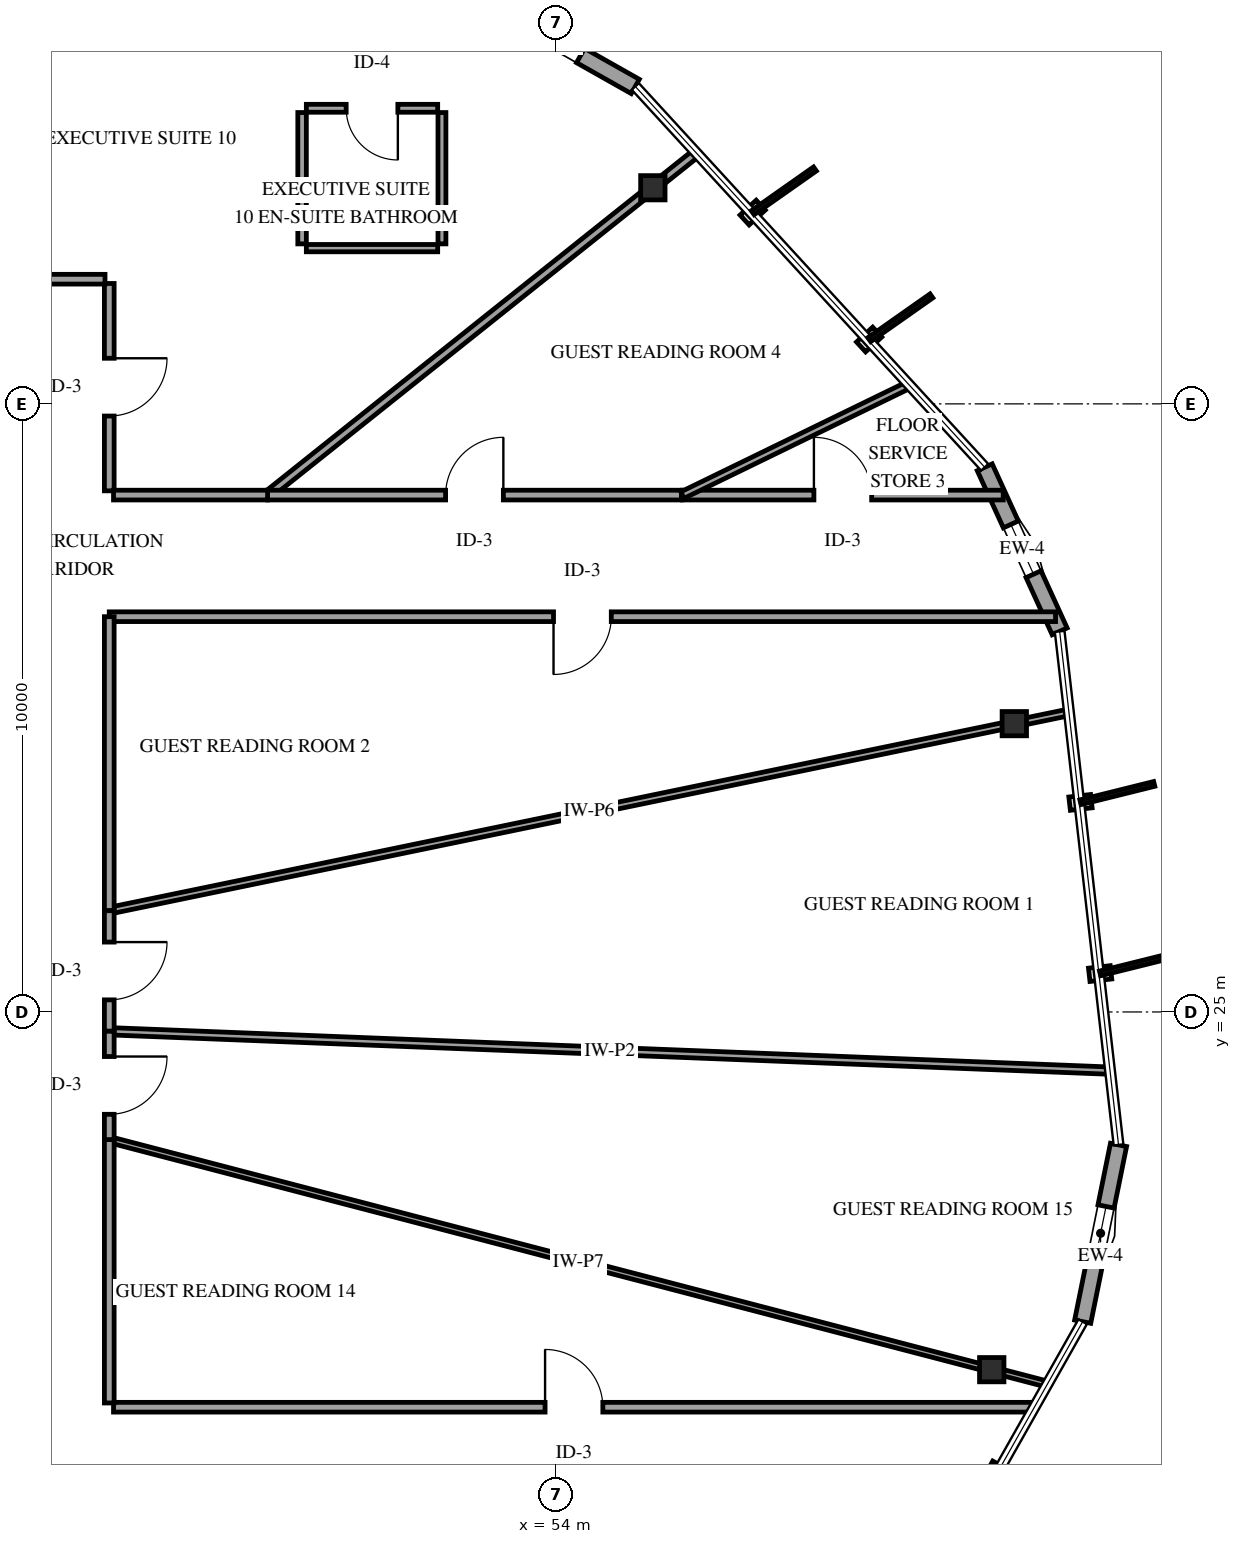
"""IFC4 building model, lengths in metres.
Left out: names, types, materials, properties, quantities, classifications, styles, units other than length and angle.
Written with IfcOpenShell. Run it as: python <this file> out.ifc"""

import sys

from ifc_helpers import new_model, si_unit, direction, frame, frame_2d, origin, origin_2d, place, context, subcontext, project, spatial, rectangle, i_section, extrude, element, fill, save


model = new_model("IFC4")
c1 = context("Model", 3, precision=1e-05, world=origin(), true_north=direction((0.0, 1.0)))
c2 = subcontext(c1, "Body", "Model", "MODEL_VIEW")
j1 = project(units=[si_unit("LENGTHUNIT", "METRE"), si_unit("PLANEANGLEUNIT", "RADIAN")], contexts=[c1])
p1 = place(None, origin())
s1 = spatial("IfcSite", under=j1, at=p1, CompositionType="ELEMENT")
p2 = place(p1, origin())
s2 = spatial("IfcBuilding", under=s1, at=p2, CompositionType="ELEMENT")
p3 = place(p2, frame((0.0, 0.0, 261.25)))
s3 = spatial("IfcBuildingStorey", under=s2, at=p3, CompositionType="ELEMENT", Elevation=261.25)
for number, where, z_axis, x_axis in (
    (1, (61.534, 29.741, 0.0), (0.0, 0.0, 1.0), (1.0, 0.0, 0.0)),
    (2, (55.589, 38.554, 0.0), (0.0, 0.0, 1.0), (1.0, 0.0, 0.0)),
    (3, (61.163, 19.117, 0.0), (0.0, 0.0, 1.0), (1.0, 0.0, 0.0)),
):
    element("IfcColumn", number, at=place(p3, frame(where, z_axis=z_axis, x_axis=x_axis)), inside=s3, PredefinedType="COLUMN", context=c2, shape_type="SweptSolid", body=[
        extrude(i_section(OverallWidth=0.401, OverallDepth=0.399, WebThickness=0.025, FlangeThickness=0.04, FilletRadius=0.038, at=origin_2d()), origin(), (0.0, 0.0, 1.0), 3.75),
    ])
p4 = place(p3, frame((62.658, 19.907, 0.0), z_axis=(0.0, 0.0, 1.0), x_axis=(0.198663496017, 0.980067760591, 0.0)))
e4 = element("IfcWall", 4, at=p4, inside=s3, PredefinedType="SOLIDWALL", context=c2, shape_type="SweptSolid", body=[
    extrude(rectangle(XDim=2.967, YDim=0.27, at=frame_2d((1.483, 0.0))), origin(), (0.0, 0.0, 1.0), 2.829),
])
p5 = place(p4, frame((1.033, 0.0, 0.75)))
e5 = element("IfcOpeningElement", 5, at=p5, cuts=e4, PredefinedType="OPENING", context=c2, shape_type="SweptSolid", body=[
    extrude(rectangle(XDim=0.9, YDim=1.5, at=frame_2d((0.45, 0.75))), frame((0.0, 0.145, 0.0), z_axis=(0.0, -1.0, 0.0), x_axis=(1.0, 0.0, 0.0)), (0.0, 0.0, 1.0), 0.29),
])
p6 = place(p3, frame((62.28, 31.259, 0.0), z_axis=(0.0, 0.0, 1.0), x_axis=(-0.415364895304, 0.909654881672, 0.0)))
e6 = element("IfcWall", 6, at=p6, inside=s3, PredefinedType="SOLIDWALL", context=c2, shape_type="SweptSolid", body=[
    extrude(rectangle(XDim=2.967, YDim=0.27, at=frame_2d((1.483, 0.0))), origin(), (0.0, 0.0, 1.0), 2.829),
])
p7 = place(p6, frame((1.033, 0.0, 0.75)))
e7 = element("IfcOpeningElement", 7, at=p7, cuts=e6, PredefinedType="OPENING", context=c2, shape_type="SweptSolid", body=[
    extrude(rectangle(XDim=0.9, YDim=1.5, at=frame_2d((0.45, 0.75))), frame((0.0, 0.145, 0.0), z_axis=(0.0, -1.0, 0.0), x_axis=(1.0, 0.0, 0.0)), (0.0, 0.0, 1.0), 0.29),
])
p8 = place(p3, frame((55.301, 40.22, 0.0), z_axis=(0.0, 0.0, 1.0), x_axis=(-0.870703816421, 0.491807751128, 0.0)))
e8 = element("IfcWall", 8, at=p8, inside=s3, PredefinedType="SOLIDWALL", context=c2, shape_type="SweptSolid", body=[
    extrude(rectangle(XDim=2.967, YDim=0.27, at=frame_2d((1.483, 0.0))), origin(), (0.0, 0.0, 1.0), 2.829),
])
p9 = place(p8, frame((1.033, 0.0, 0.75)))
e9 = element("IfcOpeningElement", 9, at=p9, cuts=e8, PredefinedType="OPENING", context=c2, shape_type="SweptSolid", body=[
    extrude(rectangle(XDim=0.9, YDim=1.5, at=frame_2d((0.45, 0.75))), frame((0.0, 0.145, 0.0), z_axis=(0.0, -1.0, 0.0), x_axis=(1.0, 0.0, 0.0)), (0.0, 0.0, 1.0), 0.29),
])
p10 = place(p3, frame((63.108, 24.035, 0.0), z_axis=(0.0, 0.0, 1.0), x_axis=(-0.999225324632, 0.039354168945, 0.0)))
e10 = element("IfcWall", 10, at=p10, inside=s3, PredefinedType="PARTITIONING", context=c2, shape_type="SweptSolid", body=[
    extrude(rectangle(XDim=16.471, YDim=0.12, at=frame_2d((8.235, 0.0))), origin(), (0.0, 0.0, 1.0), 3.45),
])
p11 = place(p3, frame((46.65, 26.665, 0.0), z_axis=(0.0, 0.0, 1.0), x_axis=(0.979300717825, 0.202410731106, 0.0)))
e11 = element("IfcWall", 11, at=p11, inside=s3, PredefinedType="PARTITIONING", context=c2, shape_type="SweptSolid", body=[
    extrude(rectangle(XDim=16.115, YDim=0.11, at=frame_2d((8.058, 0.0))), origin(), (0.0, 0.0, 1.0), 2.745),
])
p12 = place(p3, frame((46.65, 22.901, 0.0), z_axis=(0.0, 0.0, 1.0), x_axis=(0.967654990115, -0.252277268309, 0.0)))
e12 = element("IfcWall", 12, at=p12, inside=s3, PredefinedType="PARTITIONING", context=c2, shape_type="SweptSolid", body=[
    extrude(rectangle(XDim=15.943, YDim=0.1, at=frame_2d((7.971, 0.0))), origin(), (0.0, 0.0, 1.0), 3.45),
])
p13 = place(p3, frame((62.212, 31.5, 0.0), z_axis=(0.0, 0.0, 1.0), x_axis=(-1.0, 0.0, 0.0)))
e13 = element("IfcWall", 13, at=p13, inside=s3, PredefinedType="PARTITIONING", context=c2, shape_type="SweptSolid", body=[
    extrude(rectangle(XDim=15.562, YDim=0.16, at=frame_2d((7.781, 0.0))), origin(), (0.0, 0.0, 1.0), 2.824),
])
p14 = place(p13, frame((7.306, 0.0, 0.0)))
e14 = element("IfcOpeningElement", 14, at=p14, cuts=e13, PredefinedType="OPENING", context=c2, shape_type="SweptSolid", body=[
    extrude(rectangle(XDim=0.95, YDim=2.15, at=frame_2d((0.475, 1.075))), frame((0.0, 0.09, 0.0), z_axis=(0.0, -1.0, 0.0), x_axis=(1.0, 0.0, 0.0)), (0.0, 0.0, 1.0), 0.18),
])
p15 = place(p3, frame((46.72, 18.5, 0.0), z_axis=(0.0, 0.0, 1.0), x_axis=(1.0, 0.0, 0.0)))
e15 = element("IfcWall", 15, at=p15, inside=s3, PredefinedType="PARTITIONING", context=c2, shape_type="SweptSolid", body=[
    extrude(rectangle(XDim=15.144, YDim=0.16, at=frame_2d((7.572, 0.0))), origin(), (0.0, 0.0, 1.0), 2.745),
])
p16 = place(p15, frame((7.097, 0.0, 0.0)))
e16 = element("IfcOpeningElement", 16, at=p16, cuts=e15, PredefinedType="OPENING", context=c2, shape_type="SweptSolid", body=[
    extrude(rectangle(XDim=0.95, YDim=2.15, at=frame_2d((0.475, 1.075))), frame((0.0, 0.09, 0.0), z_axis=(0.0, -1.0, 0.0), x_axis=(1.0, 0.0, 0.0)), (0.0, 0.0, 1.0), 0.18),
])
p17 = place(p3, frame((49.254, 33.5, 0.0), z_axis=(0.0, 0.0, 1.0), x_axis=(0.781723660119, 0.623624982831, 0.0)))
e17 = element("IfcWall", 17, at=p17, inside=s3, PredefinedType="PARTITIONING", context=c2, shape_type="SweptSolid", body=[
    extrude(rectangle(XDim=9.02, YDim=0.14, at=frame_2d((4.51, 0.0))), origin(), (0.0, 0.0, 1.0), 3.45),
])
p18 = place(p3, frame((49.254, 33.5, 0.0), z_axis=(0.0, 0.0, 1.0), x_axis=(1.0, 0.0, 0.0)))
e18 = element("IfcWall", 18, at=p18, inside=s3, PredefinedType="PARTITIONING", context=c2, shape_type="SweptSolid", body=[
    extrude(rectangle(XDim=6.805, YDim=0.16, at=frame_2d((3.403, 0.0))), origin(), (0.0, 0.0, 1.0), 3.45),
])
p19 = place(p18, frame((2.927, 0.0, 0.0)))
e19 = element("IfcOpeningElement", 19, at=p19, cuts=e18, PredefinedType="OPENING", context=c2, shape_type="SweptSolid", body=[
    extrude(rectangle(XDim=0.95, YDim=2.15, at=frame_2d((0.475, 1.075))), frame((0.0, 0.09, 0.0), z_axis=(0.0, -1.0, 0.0), x_axis=(1.0, 0.0, 0.0)), (0.0, 0.0, 1.0), 0.18),
])
p20 = place(p3, frame((43.508, 37.05, 0.0), z_axis=(0.0, 0.0, 1.0), x_axis=(0.377035942595, 0.926198627721, 0.0)))
e20 = element("IfcWall", 20, at=p20, inside=s3, PredefinedType="PARTITIONING", context=c2, shape_type="SweptSolid", body=[
    extrude(rectangle(XDim=6.479, YDim=0.14, at=frame_2d((3.24, 0.0))), origin(), (0.0, 0.0, 1.0), 2.745),
])
p21 = place(p3, frame((56.076, 33.5, 0.0), z_axis=(0.0, 0.0, 1.0), x_axis=(1.0, 0.0, 0.0)))
e21 = element("IfcWall", 21, at=p21, inside=s3, PredefinedType="PARTITIONING", context=c2, shape_type="SweptSolid", body=[
    extrude(rectangle(XDim=5.275, YDim=0.16, at=frame_2d((2.638, 0.0))), origin(), (0.0, 0.0, 1.0), 3.45),
])
p22 = place(p21, frame((2.162, 0.0, 0.0)))
e22 = element("IfcOpeningElement", 22, at=p22, cuts=e21, PredefinedType="OPENING", context=c2, shape_type="SweptSolid", body=[
    extrude(rectangle(XDim=0.95, YDim=2.15, at=frame_2d((0.475, 1.075))), frame((0.0, 0.09, 0.0), z_axis=(0.0, -1.0, 0.0), x_axis=(1.0, 0.0, 0.0)), (0.0, 0.0, 1.0), 0.18),
])
p23 = place(p3, frame((46.65, 31.5, 0.0), z_axis=(0.0, 0.0, 1.0), x_axis=(0.0, -1.0, 0.0)))
e23 = element("IfcWall", 23, at=p23, inside=s3, PredefinedType="PARTITIONING", context=c2, shape_type="SweptSolid", body=[
    extrude(rectangle(XDim=4.835, YDim=0.16, at=frame_2d((2.417, 0.0))), origin(), (0.0, 0.0, 1.0), 3.45),
])
p24 = place(p3, frame((46.65, 22.901, 0.0), z_axis=(0.0, 0.0, 1.0), x_axis=(0.0, -1.0, 0.0)))
e24 = element("IfcWall", 24, at=p24, inside=s3, PredefinedType="PARTITIONING", context=c2, shape_type="SweptSolid", body=[
    extrude(rectangle(XDim=4.331, YDim=0.16, at=frame_2d((2.166, 0.0))), origin(), (0.0, 0.0, 1.0), 3.45),
])
p25 = place(p3, frame((56.076, 33.5, 0.0), z_axis=(0.0, 0.0, 1.0), x_axis=(0.899158676247, 0.437622754128, 0.0)))
e25 = element("IfcWall", 25, at=p25, inside=s3, PredefinedType="PARTITIONING", context=c2, shape_type="SweptSolid", body=[
    extrude(rectangle(XDim=4.145, YDim=0.12, at=frame_2d((2.073, 0.0))), origin(), (0.0, 0.0, 1.0), 3.45),
])
p26 = place(p3, frame((46.65, 36.98, 0.0), z_axis=(0.0, 0.0, 1.0), x_axis=(0.0, -1.0, 0.0)))
e26 = element("IfcWall", 26, at=p26, inside=s3, PredefinedType="PARTITIONING", context=c2, shape_type="SweptSolid", body=[
    extrude(rectangle(XDim=3.41, YDim=0.16, at=frame_2d((1.705, 0.0))), origin(), (0.0, 0.0, 1.0), 3.45),
])
p27 = place(p26, frame((1.23, 0.0, 0.0)))
e27 = element("IfcOpeningElement", 27, at=p27, cuts=e26, PredefinedType="OPENING", context=c2, shape_type="SweptSolid", body=[
    extrude(rectangle(XDim=0.95, YDim=2.15, at=frame_2d((0.475, 1.075))), frame((0.0, 0.09, 0.0), z_axis=(0.0, -1.0, 0.0), x_axis=(1.0, 0.0, 0.0)), (0.0, 0.0, 1.0), 0.18),
])
p28 = place(p3, frame((43.508, 37.05, 0.0), z_axis=(0.0, 0.0, 1.0), x_axis=(1.0, 0.0, 0.0)))
e28 = element("IfcWall", 28, at=p28, inside=s3, PredefinedType="PARTITIONING", context=c2, shape_type="SweptSolid", body=[
    extrude(rectangle(XDim=3.072, YDim=0.16, at=frame_2d((1.536, 0.0))), origin(), (0.0, 0.0, 1.0), 3.45),
])
p29 = place(p3, frame((46.72, 33.5, 0.0), z_axis=(0.0, 0.0, 1.0), x_axis=(1.0, 0.0, 0.0)))
e29 = element("IfcWall", 29, at=p29, inside=s3, PredefinedType="PARTITIONING", context=c2, shape_type="SweptSolid", body=[
    extrude(rectangle(XDim=2.534, YDim=0.16, at=frame_2d((1.267, 0.0))), origin(), (0.0, 0.0, 1.0), 3.45),
])
p30 = place(p3, frame((52.051, 39.861, 0.0), z_axis=(0.0, 0.0, 1.0), x_axis=(-1.0, 0.0, 0.0)))
e30 = element("IfcWall", 30, at=p30, inside=s3, PredefinedType="PARTITIONING", context=c2, shape_type="SweptSolid", body=[
    extrude(rectangle(XDim=2.16, YDim=0.13, at=frame_2d((1.08, 0.0))), origin(), (0.0, 0.0, 1.0), 3.45),
])
p31 = place(p30, frame((0.655, 0.0, 0.0)))
e31 = element("IfcOpeningElement", 31, at=p31, cuts=e30, PredefinedType="OPENING", context=c2, shape_type="SweptSolid", body=[
    extrude(rectangle(XDim=0.85, YDim=2.1, at=frame_2d((0.425, 1.05))), frame((0.0, 0.075, 0.0), z_axis=(0.0, -1.0, 0.0), x_axis=(1.0, 0.0, 0.0)), (0.0, 0.0, 1.0), 0.15),
])
p32 = place(p3, frame((49.891, 37.561, 0.0), z_axis=(0.0, 0.0, 1.0), x_axis=(1.0, 0.0, 0.0)))
e32 = element("IfcWall", 32, at=p32, inside=s3, PredefinedType="PARTITIONING", context=c2, shape_type="SweptSolid", body=[
    extrude(rectangle(XDim=2.16, YDim=0.12, at=frame_2d((1.08, 0.0))), origin(), (0.0, 0.0, 1.0), 3.45),
])
p33 = place(p3, frame((49.821, 39.791, 0.0), z_axis=(0.0, 0.0, 1.0), x_axis=(0.0, -1.0, 0.0)))
e33 = element("IfcWall", 33, at=p33, inside=s3, PredefinedType="PARTITIONING", context=c2, shape_type="SweptSolid", body=[
    extrude(rectangle(XDim=2.16, YDim=0.14, at=frame_2d((1.08, 0.0))), origin(), (0.0, 0.0, 1.0), 3.45),
])
p34 = place(p3, frame((52.121, 37.631, 0.0), z_axis=(0.0, 0.0, 1.0), x_axis=(0.0, 1.0, 0.0)))
e34 = element("IfcWall", 34, at=p34, inside=s3, PredefinedType="PARTITIONING", context=c2, shape_type="SweptSolid", body=[
    extrude(rectangle(XDim=2.16, YDim=0.13, at=frame_2d((1.08, 0.0))), origin(), (0.0, 0.0, 1.0), 3.45),
])
p35 = place(p3, frame((46.65, 26.665, 0.0), z_axis=(0.0, 0.0, 1.0), x_axis=(0.0, -1.0, 0.0)))
e35 = element("IfcWall", 35, at=p35, inside=s3, PredefinedType="PARTITIONING", context=c2, shape_type="SweptSolid", body=[
    extrude(rectangle(XDim=1.982, YDim=0.16, at=frame_2d((0.991, 0.0))), origin(), (0.0, 0.0, 1.0), 3.45),
])
p36 = place(p35, frame((0.516, 0.0, 0.0)))
e36 = element("IfcOpeningElement", 36, at=p36, cuts=e35, PredefinedType="OPENING", context=c2, shape_type="SweptSolid", body=[
    extrude(rectangle(XDim=0.95, YDim=2.15, at=frame_2d((0.475, 1.075))), frame((0.0, 0.09, 0.0), z_axis=(0.0, -1.0, 0.0), x_axis=(1.0, 0.0, 0.0)), (0.0, 0.0, 1.0), 0.18),
])
p37 = place(p3, frame((46.65, 24.683, 0.0), z_axis=(0.0, 0.0, 1.0), x_axis=(0.0, -1.0, 0.0)))
e37 = element("IfcWall", 37, at=p37, inside=s3, PredefinedType="PARTITIONING", context=c2, shape_type="SweptSolid", body=[
    extrude(rectangle(XDim=1.782, YDim=0.16, at=frame_2d((0.891, 0.0))), origin(), (0.0, 0.0, 1.0), 3.45),
])
p38 = place(p37, frame((0.416, 0.0, 0.0)))
e38 = element("IfcOpeningElement", 38, at=p38, cuts=e37, PredefinedType="OPENING", context=c2, shape_type="SweptSolid", body=[
    extrude(rectangle(XDim=0.95, YDim=2.15, at=frame_2d((0.475, 1.075))), frame((0.0, 0.09, 0.0), z_axis=(0.0, -1.0, 0.0), x_axis=(1.0, 0.0, 0.0)), (0.0, 0.0, 1.0), 0.18),
])
p39 = place(p5, origin())
e39 = element("IfcWindow", 39, at=p39, inside=s3, PartitioningType="SINGLE_PANEL", PredefinedType="WINDOW", context=c2, shape_type="SweptSolid", body=[
    extrude(rectangle(XDim=0.9, YDim=1.5, at=frame_2d((0.45, 0.75))), frame((0.0, 0.03, 0.0), z_axis=(0.0, -1.0, 0.0), x_axis=(1.0, 0.0, 0.0)), (0.0, 0.0, 1.0), 0.06),
])
fill(e5, e39)
p40 = place(p7, origin())
e40 = element("IfcWindow", 40, at=p40, inside=s3, PartitioningType="SINGLE_PANEL", PredefinedType="WINDOW", context=c2, shape_type="SweptSolid", body=[
    extrude(rectangle(XDim=0.9, YDim=1.5, at=frame_2d((0.45, 0.75))), frame((0.0, 0.03, 0.0), z_axis=(0.0, -1.0, 0.0), x_axis=(1.0, 0.0, 0.0)), (0.0, 0.0, 1.0), 0.06),
])
fill(e7, e40)
p41 = place(p9, origin())
e41 = element("IfcWindow", 41, at=p41, inside=s3, PartitioningType="SINGLE_PANEL", PredefinedType="WINDOW", context=c2, shape_type="SweptSolid", body=[
    extrude(rectangle(XDim=0.9, YDim=1.5, at=frame_2d((0.45, 0.75))), frame((0.0, 0.03, 0.0), z_axis=(0.0, -1.0, 0.0), x_axis=(1.0, 0.0, 0.0)), (0.0, 0.0, 1.0), 0.06),
])
fill(e9, e41)
p42 = place(p14, origin())
e42 = element("IfcDoor", 42, at=p42, inside=s3, OperationType="SINGLE_SWING_RIGHT", PredefinedType="DOOR", context=c2, shape_type="SweptSolid", body=[
    extrude(rectangle(XDim=0.95, YDim=2.15, at=frame_2d((0.475, 1.075))), frame((0.0, 0.025, 0.0), z_axis=(0.0, -1.0, 0.0), x_axis=(1.0, 0.0, 0.0)), (0.0, 0.0, 1.0), 0.05),
])
fill(e14, e42)
p43 = place(p16, origin())
e43 = element("IfcDoor", 43, at=p43, inside=s3, OperationType="SINGLE_SWING_LEFT", PredefinedType="DOOR", context=c2, shape_type="SweptSolid", body=[
    extrude(rectangle(XDim=0.95, YDim=2.15, at=frame_2d((0.475, 1.075))), frame((0.0, 0.025, 0.0), z_axis=(0.0, -1.0, 0.0), x_axis=(1.0, 0.0, 0.0)), (0.0, 0.0, 1.0), 0.05),
])
fill(e16, e43)
p44 = place(p19, origin())
e44 = element("IfcDoor", 44, at=p44, inside=s3, OperationType="SINGLE_SWING_RIGHT", PredefinedType="DOOR", context=c2, shape_type="SweptSolid", body=[
    extrude(rectangle(XDim=0.95, YDim=2.15, at=frame_2d((0.475, 1.075))), frame((0.0, 0.025, 0.0), z_axis=(0.0, -1.0, 0.0), x_axis=(1.0, 0.0, 0.0)), (0.0, 0.0, 1.0), 0.05),
])
fill(e19, e44)
p45 = place(p22, origin())
e45 = element("IfcDoor", 45, at=p45, inside=s3, OperationType="SINGLE_SWING_LEFT", PredefinedType="DOOR", context=c2, shape_type="SweptSolid", body=[
    extrude(rectangle(XDim=0.95, YDim=2.15, at=frame_2d((0.475, 1.075))), frame((0.0, 0.025, 0.0), z_axis=(0.0, -1.0, 0.0), x_axis=(1.0, 0.0, 0.0)), (0.0, 0.0, 1.0), 0.05),
])
fill(e22, e45)
p46 = place(p27, origin())
e46 = element("IfcDoor", 46, at=p46, inside=s3, OperationType="SINGLE_SWING_LEFT", PredefinedType="DOOR", context=c2, shape_type="SweptSolid", body=[
    extrude(rectangle(XDim=0.95, YDim=2.15, at=frame_2d((0.475, 1.075))), frame((0.0, 0.025, 0.0), z_axis=(0.0, -1.0, 0.0), x_axis=(1.0, 0.0, 0.0)), (0.0, 0.0, 1.0), 0.05),
])
fill(e27, e46)
p47 = place(p31, origin())
e47 = element("IfcDoor", 47, at=p47, inside=s3, OperationType="SINGLE_SWING_LEFT", PredefinedType="DOOR", context=c2, shape_type="SweptSolid", body=[
    extrude(rectangle(XDim=0.85, YDim=2.1, at=frame_2d((0.425, 1.05))), frame((0.0, 0.025, 0.0), z_axis=(0.0, -1.0, 0.0), x_axis=(1.0, 0.0, 0.0)), (0.0, 0.0, 1.0), 0.05),
])
fill(e31, e47)
p48 = place(p36, origin())
e48 = element("IfcDoor", 48, at=p48, inside=s3, OperationType="SINGLE_SWING_LEFT", PredefinedType="DOOR", context=c2, shape_type="SweptSolid", body=[
    extrude(rectangle(XDim=0.95, YDim=2.15, at=frame_2d((0.475, 1.075))), frame((0.0, 0.025, 0.0), z_axis=(0.0, -1.0, 0.0), x_axis=(1.0, 0.0, 0.0)), (0.0, 0.0, 1.0), 0.05),
])
fill(e36, e48)
p49 = place(p38, origin())
e49 = element("IfcDoor", 49, at=p49, inside=s3, OperationType="SINGLE_SWING_LEFT", PredefinedType="DOOR", context=c2, shape_type="SweptSolid", body=[
    extrude(rectangle(XDim=0.95, YDim=2.15, at=frame_2d((0.475, 1.075))), frame((0.0, 0.025, 0.0), z_axis=(0.0, -1.0, 0.0), x_axis=(1.0, 0.0, 0.0)), (0.0, 0.0, 1.0), 0.05),
])
fill(e38, e49)
save(model, sys.argv[1])
